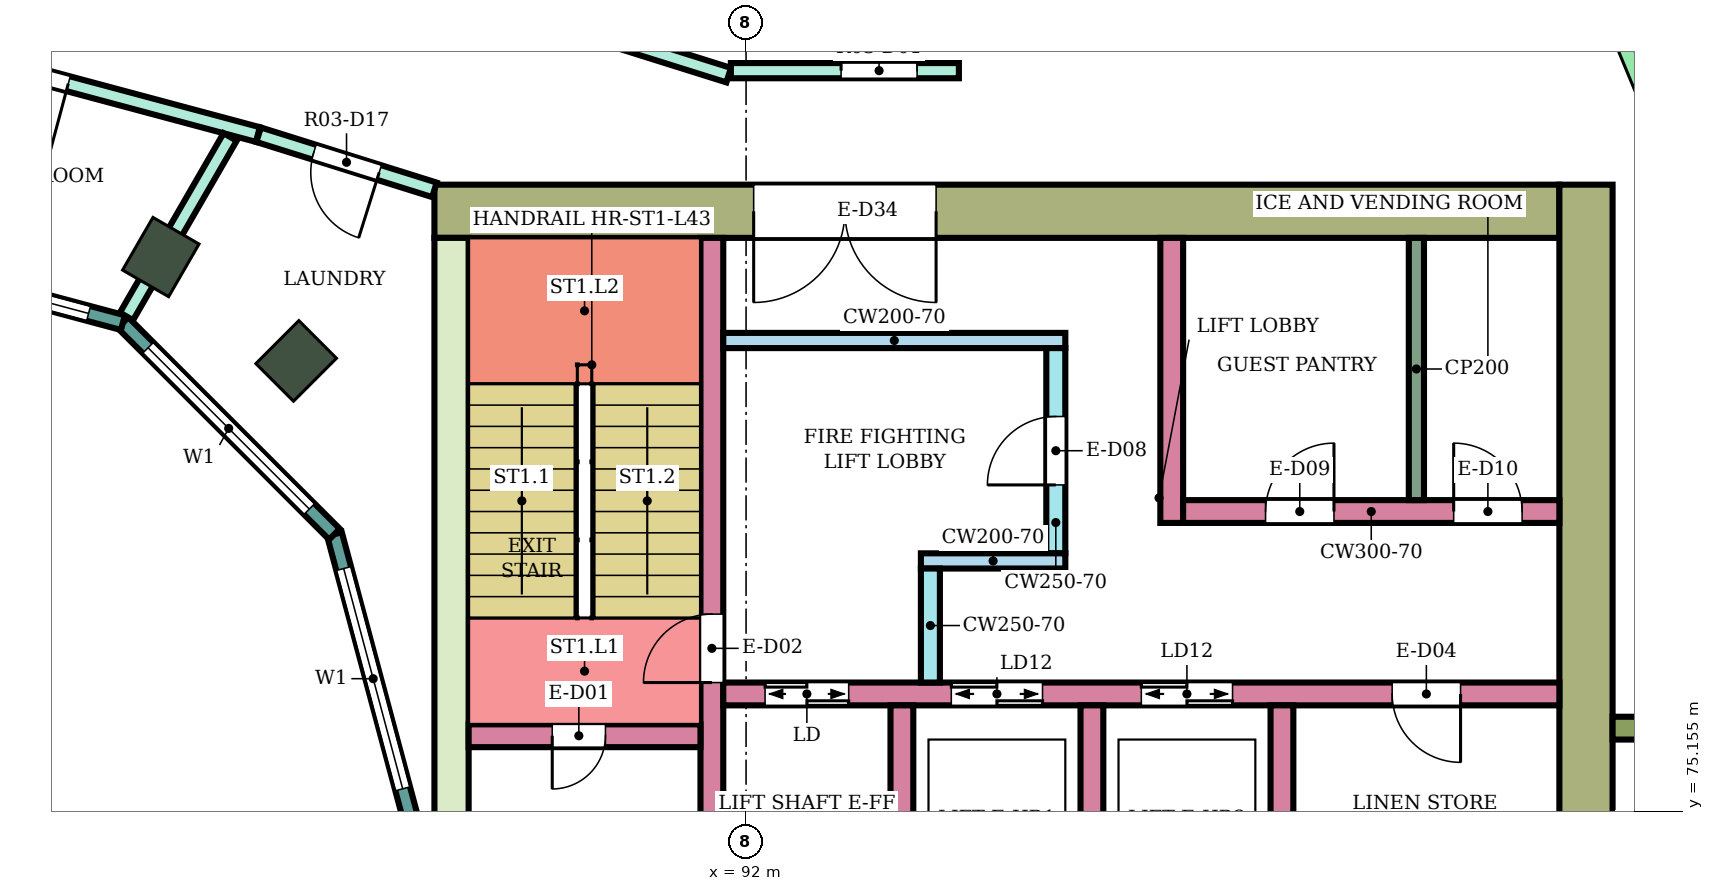
"""IFC4 building model, lengths in metres.
Left out: names, types, materials, properties, quantities, classifications, styles, units other than length and angle.
Written with IfcOpenShell. Run it as: python <this file> out.ifc"""

import sys

from ifc_helpers import new_model, si_unit, direction, frame, frame_2d, origin, origin_2d, place, context, subcontext, project, spatial, rectangle, extrude, element, fill, save


model = new_model("IFC4")
c1 = context("Model", 3, precision=1e-05, world=origin(), true_north=direction((0.0, 1.0)))
c2 = subcontext(c1, "Body", "Model", "MODEL_VIEW")
j1 = project(units=[si_unit("LENGTHUNIT", "METRE"), si_unit("PLANEANGLEUNIT", "RADIAN")], contexts=[c1])
p1 = place(None, origin())
s1 = spatial("IfcSite", under=j1, at=p1, CompositionType="ELEMENT")
p2 = place(p1, origin())
s2 = spatial("IfcBuilding", under=s1, at=p2, CompositionType="ELEMENT")
p3 = place(p2, frame((0.0, 0.0, 186.4)))
s3 = spatial("IfcBuildingStorey", under=s2, at=p3, CompositionType="ELEMENT", Elevation=186.4)
for number, where, z_axis, x_axis in (
    (1, (86.081, 81.081, 0.0), (0.0, 0.0, 1.0), (0.707, 0.707, 0.0)),
    (2, (84.3, 82.448, 0.0), (0.0, 0.0, 1.0), (0.5, 0.866, 0.0)),
):
    element("IfcColumn", number, at=place(p3, frame(where, z_axis=z_axis, x_axis=x_axis)), inside=s3, PredefinedType="COLUMN", context=c2, shape_type="SweptSolid", body=[
        extrude(rectangle(XDim=0.8, YDim=0.7, at=origin_2d()), origin(), (0.0, 0.0, 1.0), 4.1),
    ])
p4 = place(p3, frame((87.9, 83.05, 0.0), z_axis=(0.0, 0.0, 1.0), x_axis=(1.0, 0.0, 0.0)))
e3 = element("IfcWall", 3, at=p4, inside=s3, PredefinedType="SHEAR", context=c2, shape_type="SweptSolid", body=[
    extrude(rectangle(XDim=14.8, YDim=0.7, at=frame_2d((7.4, 0.0))), origin(), (0.0, 0.0, 1.0), 3.78),
])
p5 = place(p4, frame((4.2, 0.0, 0.0)))
e4 = element("IfcOpeningElement", 4, at=p5, cuts=e3, PredefinedType="OPENING", context=c2, shape_type="SweptSolid", body=[
    extrude(rectangle(XDim=2.4, YDim=2.4, at=frame_2d((1.2, 1.2))), frame((0.0, 0.36, 0.0), z_axis=(0.0, -1.0, 0.0), x_axis=(1.0, 0.0, 0.0)), (0.0, 0.0, 1.0), 0.72),
])
p6 = place(p3, frame((88.125, 75.0, 0.0), z_axis=(0.0, 0.0, 1.0), x_axis=(0.0, 1.0, 0.0)))
e5 = element("IfcWall", 5, at=p6, inside=s3, PredefinedType="SHEAR", context=c2, shape_type="SweptSolid", body=[
    extrude(rectangle(XDim=7.7, YDim=0.45, at=frame_2d((3.85, 0.0))), origin(), (0.0, 0.0, 1.0), 3.78),
])
p7 = place(p3, frame((103.05, 66.6, 0.0), z_axis=(0.0, 0.0, 1.0), x_axis=(0.0, 1.0, 0.0)))
e6 = element("IfcWall", 6, at=p7, inside=s3, PredefinedType="SHEAR", context=c2, shape_type="SweptSolid", body=[
    extrude(rectangle(XDim=16.8, YDim=0.7, at=frame_2d((8.4, 0.0))), origin(), (0.0, 0.0, 1.0), 3.78),
])
p8 = place(p3, frame((91.55, 75.0, 0.0), z_axis=(0.0, 0.0, 1.0), x_axis=(0.0, 1.0, 0.0)))
e7 = element("IfcWall", 7, at=p8, inside=s3, PredefinedType="SHEAR", context=c2, shape_type="SweptSolid", body=[
    extrude(rectangle(XDim=7.7, YDim=0.3, at=frame_2d((3.85, 0.0))), origin(), (0.0, 0.0, 1.0), 3.78),
])
p9 = place(p8, frame((1.85, 0.0, 0.0)))
e8 = element("IfcOpeningElement", 8, at=p9, cuts=e7, PredefinedType="OPENING", context=c2, shape_type="SweptSolid", body=[
    extrude(rectangle(XDim=0.9, YDim=2.1, at=frame_2d((0.45, 1.05))), frame((0.0, 0.16, 0.0), z_axis=(0.0, -1.0, 0.0), x_axis=(1.0, 0.0, 0.0)), (0.0, 0.0, 1.0), 0.32),
])
p10 = place(p3, frame((88.35, 76.15, 0.0), z_axis=(0.0, 0.0, 1.0), x_axis=(1.0, 0.0, 0.0)))
e9 = element("IfcWall", 9, at=p10, inside=s3, PredefinedType="SHEAR", context=c2, shape_type="SweptSolid", body=[
    extrude(rectangle(XDim=3.05, YDim=0.3, at=frame_2d((1.525, 0.0))), origin(), (0.0, 0.0, 1.0), 3.78),
])
p11 = place(p10, frame((1.1, 0.0, 0.0)))
e10 = element("IfcOpeningElement", 10, at=p11, cuts=e9, PredefinedType="OPENING", context=c2, shape_type="SweptSolid", body=[
    extrude(rectangle(XDim=0.7, YDim=2.0, at=frame_2d((0.35, 1.0))), frame((0.0, 0.16, 0.0), z_axis=(0.0, -1.0, 0.0), x_axis=(1.0, 0.0, 0.0)), (0.0, 0.0, 1.0), 0.32),
])
p12 = place(p3, frame((91.7, 76.7, 0.0), z_axis=(0.0, 0.0, 1.0), x_axis=(1.0, 0.0, 0.0)))
e11 = element("IfcWall", 11, at=p12, inside=s3, PredefinedType="SHEAR", context=c2, shape_type="SweptSolid", body=[
    extrude(rectangle(XDim=11.0, YDim=0.3, at=frame_2d((5.5, 0.0))), origin(), (0.0, 0.0, 1.0), 3.78),
])
p13 = place(p12, frame((0.55, 0.0, 0.0)))
e12 = element("IfcOpeningElement", 12, at=p13, cuts=e11, PredefinedType="OPENING", context=c2, shape_type="SweptSolid", body=[
    extrude(rectangle(XDim=1.1, YDim=2.1, at=frame_2d((0.55, 1.05))), frame((0.0, 0.16, 0.0), z_axis=(0.0, -1.0, 0.0), x_axis=(1.0, 0.0, 0.0)), (0.0, 0.0, 1.0), 0.32),
])
p14 = place(p12, frame((3.0, 0.0, 0.0)))
e13 = element("IfcOpeningElement", 13, at=p14, cuts=e11, PredefinedType="OPENING", context=c2, shape_type="SweptSolid", body=[
    extrude(rectangle(XDim=1.2, YDim=2.1, at=frame_2d((0.6, 1.05))), frame((0.0, 0.16, 0.0), z_axis=(0.0, -1.0, 0.0), x_axis=(1.0, 0.0, 0.0)), (0.0, 0.0, 1.0), 0.32),
])
p15 = place(p12, frame((5.5, 0.0, 0.0)))
e14 = element("IfcOpeningElement", 14, at=p15, cuts=e11, PredefinedType="OPENING", context=c2, shape_type="SweptSolid", body=[
    extrude(rectangle(XDim=1.2, YDim=2.1, at=frame_2d((0.6, 1.05))), frame((0.0, 0.16, 0.0), z_axis=(0.0, -1.0, 0.0), x_axis=(1.0, 0.0, 0.0)), (0.0, 0.0, 1.0), 0.32),
])
p16 = place(p12, frame((8.8, 0.0, 0.0)))
e15 = element("IfcOpeningElement", 15, at=p16, cuts=e11, PredefinedType="OPENING", context=c2, shape_type="SweptSolid", body=[
    extrude(rectangle(XDim=0.9, YDim=2.1, at=frame_2d((0.45, 1.05))), frame((0.0, 0.16, 0.0), z_axis=(0.0, -1.0, 0.0), x_axis=(1.0, 0.0, 0.0)), (0.0, 0.0, 1.0), 0.32),
])
for number, where, z_axis, x_axis in (
    (16, (94.05, 74.0, 0.0), (0.0, 0.0, 1.0), (0.0, 1.0, 0.0)),
    (17, (96.55, 74.0, 0.0), (0.0, 0.0, 1.0), (0.0, 1.0, 0.0)),
    (18, (99.05, 74.0, 0.0), (0.0, 0.0, 1.0), (0.0, 1.0, 0.0)),
):
    element("IfcWall", number, at=place(p3, frame(where, z_axis=z_axis, x_axis=x_axis)), inside=s3, PredefinedType="SHEAR", context=c2, shape_type="SweptSolid", body=[
        extrude(rectangle(XDim=2.55, YDim=0.3, at=frame_2d((1.275, 0.0))), origin(), (0.0, 0.0, 1.0), 3.78),
    ])
p17 = place(p3, frame((91.7, 81.35, 0.0), z_axis=(0.0, 0.0, 1.0), x_axis=(1.0, 0.0, 0.0)))
e19 = element("IfcWall", 19, at=p17, inside=s3, PredefinedType="SHEAR", context=c2, shape_type="SweptSolid", body=[
    extrude(rectangle(XDim=4.5, YDim=0.2, at=frame_2d((2.25, 0.0))), origin(), (0.0, 0.0, 1.0), 3.78),
])
p18 = place(p3, frame((96.075, 78.55, 0.0), z_axis=(0.0, 0.0, 1.0), x_axis=(0.0, 1.0, 0.0)))
e20 = element("IfcWall", 20, at=p18, inside=s3, PredefinedType="SHEAR", context=c2, shape_type="SweptSolid", body=[
    extrude(rectangle(XDim=2.7, YDim=0.25, at=frame_2d((1.35, 0.0))), origin(), (0.0, 0.0, 1.0), 3.78),
])
p19 = place(p18, frame((0.9, 0.0, 0.0)))
e21 = element("IfcOpeningElement", 21, at=p19, cuts=e20, PredefinedType="OPENING", context=c2, shape_type="SweptSolid", body=[
    extrude(rectangle(XDim=0.9, YDim=2.1, at=frame_2d((0.45, 1.05))), frame((0.0, 0.135, 0.0), z_axis=(0.0, -1.0, 0.0), x_axis=(1.0, 0.0, 0.0)), (0.0, 0.0, 1.0), 0.27),
])
p20 = place(p3, frame((94.3, 78.45, 0.0), z_axis=(0.0, 0.0, 1.0), x_axis=(1.0, 0.0, 0.0)))
e22 = element("IfcWall", 22, at=p20, inside=s3, PredefinedType="SHEAR", context=c2, shape_type="SweptSolid", body=[
    extrude(rectangle(XDim=1.9, YDim=0.2, at=frame_2d((0.95, 0.0))), origin(), (0.0, 0.0, 1.0), 3.78),
])
p21 = place(p3, frame((94.425, 76.85, 0.0), z_axis=(0.0, 0.0, 1.0), x_axis=(0.0, 1.0, 0.0)))
e23 = element("IfcWall", 23, at=p21, inside=s3, PredefinedType="SHEAR", context=c2, shape_type="SweptSolid", body=[
    extrude(rectangle(XDim=1.5, YDim=0.25, at=frame_2d((0.75, 0.0))), origin(), (0.0, 0.0, 1.0), 3.78),
])
p22 = place(p3, frame((97.6, 78.95, 0.0), z_axis=(0.0, 0.0, 1.0), x_axis=(0.0, 1.0, 0.0)))
e24 = element("IfcWall", 24, at=p22, inside=s3, PredefinedType="SHEAR", context=c2, shape_type="SweptSolid", body=[
    extrude(rectangle(XDim=3.75, YDim=0.3, at=frame_2d((1.875, 0.0))), origin(), (0.0, 0.0, 1.0), 3.78),
])
p23 = place(p3, frame((97.75, 79.1, 0.0), z_axis=(0.0, 0.0, 1.0), x_axis=(1.0, 0.0, 0.0)))
e25 = element("IfcWall", 25, at=p23, inside=s3, PredefinedType="SHEAR", context=c2, shape_type="SweptSolid", body=[
    extrude(rectangle(XDim=4.95, YDim=0.3, at=frame_2d((2.475, 0.0))), origin(), (0.0, 0.0, 1.0), 3.78),
])
p24 = place(p23, frame((1.084, 0.0, 0.0)))
e26 = element("IfcOpeningElement", 26, at=p24, cuts=e25, PredefinedType="OPENING", context=c2, shape_type="SweptSolid", body=[
    extrude(rectangle(XDim=0.9, YDim=2.1, at=frame_2d((0.45, 1.05))), frame((0.0, 0.16, 0.0), z_axis=(0.0, -1.0, 0.0), x_axis=(1.0, 0.0, 0.0)), (0.0, 0.0, 1.0), 0.32),
])
p25 = place(p23, frame((3.56, 0.0, 0.0)))
e27 = element("IfcOpeningElement", 27, at=p25, cuts=e25, PredefinedType="OPENING", context=c2, shape_type="SweptSolid", body=[
    extrude(rectangle(XDim=0.9, YDim=2.1, at=frame_2d((0.45, 1.05))), frame((0.0, 0.16, 0.0), z_axis=(0.0, -1.0, 0.0), x_axis=(1.0, 0.0, 0.0)), (0.0, 0.0, 1.0), 0.32),
])
p26 = place(p3, frame((103.4, 76.25, 0.0), z_axis=(0.0, 0.0, 1.0), x_axis=(1.0, 0.0, 0.0)))
e28 = element("IfcWall", 28, at=p26, inside=s3, PredefinedType="NOTDEFINED", context=c2, shape_type="SweptSolid", body=[
    extrude(rectangle(XDim=2.416, YDim=0.3, at=frame_2d((1.208, 0.0))), origin(), (0.0, 0.0, 1.0), 4.1),
])
p27 = place(p3, frame((87.604, 75.0, 0.0), z_axis=(0.0, 0.0, 1.0), x_axis=(-0.258789828301, 0.965933654434, 0.0)))
e29 = element("IfcWall", 29, at=p27, inside=s3, PredefinedType="NOTDEFINED", context=c2, shape_type="SweptSolid", body=[
    extrude(rectangle(XDim=3.936, YDim=0.2, at=frame_2d((1.968, 0.0))), origin(), (0.0, 0.0, 1.0), 4.1),
])
p28 = place(p27, frame((0.468, 0.0, 0.9)))
e30 = element("IfcOpeningElement", 30, at=p28, cuts=e29, PredefinedType="OPENING", context=c2, shape_type="SweptSolid", body=[
    extrude(rectangle(XDim=3.0, YDim=2.3, at=frame_2d((1.5, 1.15))), frame((0.0, 0.11, 0.0), z_axis=(0.0, -1.0, 0.0), x_axis=(1.0, 0.0, 0.0)), (0.0, 0.0, 1.0), 0.22),
])
p29 = place(p3, frame((86.585, 78.802, 0.0), z_axis=(0.0, 0.0, 1.0), x_axis=(-0.707106781187, 0.707106781187, 0.0)))
e31 = element("IfcWall", 31, at=p29, inside=s3, PredefinedType="NOTDEFINED", context=c2, shape_type="SweptSolid", body=[
    extrude(rectangle(XDim=3.936, YDim=0.2, at=frame_2d((1.968, 0.0))), origin(), (0.0, 0.0, 1.0), 4.1),
])
p30 = place(p29, frame((0.468, 0.0, 0.9)))
e32 = element("IfcOpeningElement", 32, at=p30, cuts=e31, PredefinedType="OPENING", context=c2, shape_type="SweptSolid", body=[
    extrude(rectangle(XDim=3.0, YDim=2.3, at=frame_2d((1.5, 1.15))), frame((0.0, 0.11, 0.0), z_axis=(0.0, -1.0, 0.0), x_axis=(1.0, 0.0, 0.0)), (0.0, 0.0, 1.0), 0.22),
])
p31 = place(p3, frame((83.802, 81.585, 0.0), z_axis=(0.0, 0.0, 1.0), x_axis=(-0.965933654434, 0.258789828301, 0.0)))
e33 = element("IfcWall", 33, at=p31, inside=s3, PredefinedType="NOTDEFINED", context=c2, shape_type="SweptSolid", body=[
    extrude(rectangle(XDim=3.936, YDim=0.2, at=frame_2d((1.968, 0.0))), origin(), (0.0, 0.0, 1.0), 4.1),
])
p32 = place(p31, frame((0.468, 0.0, 0.9)))
e34 = element("IfcOpeningElement", 34, at=p32, cuts=e33, PredefinedType="OPENING", context=c2, shape_type="SweptSolid", body=[
    extrude(rectangle(XDim=3.0, YDim=2.3, at=frame_2d((1.5, 1.15))), frame((0.0, 0.11, 0.0), z_axis=(0.0, -1.0, 0.0), x_axis=(1.0, 0.0, 0.0)), (0.0, 0.0, 1.0), 0.22),
])
p33 = place(p3, frame((80.0, 85.554, 0.0), z_axis=(0.0, 0.0, 1.0), x_axis=(0.965928989968, -0.258807237802, 0.0)))
e35 = element("IfcWall", 35, at=p33, inside=s3, PredefinedType="PARTITIONING", context=c2, shape_type="SweptSolid", body=[
    extrude(rectangle(XDim=5.774, YDim=0.2, at=frame_2d((2.887, 0.0))), origin(), (0.0, 0.0, 1.0), 3.65),
])
p34 = place(p33, frame((2.292, 0.0, 0.0)))
e36 = element("IfcOpeningElement", 36, at=p34, cuts=e35, PredefinedType="OPENING", context=c2, shape_type="SweptSolid", body=[
    extrude(rectangle(XDim=0.9, YDim=2.1, at=frame_2d((0.45, 1.05))), frame((0.0, 0.11, 0.0), z_axis=(0.0, -1.0, 0.0), x_axis=(1.0, 0.0, 0.0)), (0.0, 0.0, 1.0), 0.22),
])
p35 = place(p3, frame((83.849, 81.667, 0.0), z_axis=(0.0, 0.0, 1.0), x_axis=(0.500117899823, 0.865957323588, 0.0)))
e37 = element("IfcWall", 37, at=p35, inside=s3, PredefinedType="PARTITIONING", context=c2, shape_type="SweptSolid", body=[
    extrude(rectangle(XDim=2.725, YDim=0.2, at=frame_2d((1.363, 0.0))), origin(), (0.0, 0.0, 1.0), 3.65),
])
p36 = place(p3, frame((85.587, 84.057, 0.0), z_axis=(0.0, 0.0, 1.0), x_axis=(0.954239513179, -0.299043393987, 0.0)))
e38 = element("IfcWall", 38, at=p36, inside=s3, PredefinedType="PARTITIONING", context=c2, shape_type="SweptSolid", body=[
    extrude(rectangle(XDim=2.424, YDim=0.2, at=frame_2d((1.212, 0.0))), origin(), (0.0, 0.0, 1.0), 3.65),
])
p37 = place(p36, frame((0.762, 0.0, 0.0)))
e39 = element("IfcOpeningElement", 39, at=p37, cuts=e38, PredefinedType="OPENING", context=c2, shape_type="SweptSolid", body=[
    extrude(rectangle(XDim=0.9, YDim=2.1, at=frame_2d((0.45, 1.05))), frame((0.0, 0.11, 0.0), z_axis=(0.0, -1.0, 0.0), x_axis=(1.0, 0.0, 0.0)), (0.0, 0.0, 1.0), 0.22),
])
p38 = place(p3, frame((86.313, 86.554, 0.0), z_axis=(0.0, 0.0, 1.0), x_axis=(0.954081217458, -0.299548043717, 0.0)))
e40 = element("IfcWall", 40, at=p38, inside=s3, PredefinedType="PARTITIONING", context=c2, shape_type="SweptSolid", body=[
    extrude(rectangle(XDim=5.721, YDim=0.2, at=frame_2d((2.86, 0.0))), origin(), (0.0, 0.0, 1.0), 3.65),
])
p39 = place(p3, frame((91.8, 84.9, 0.0), z_axis=(0.0, 0.0, 1.0), x_axis=(1.0, 0.0, 0.0)))
e41 = element("IfcWall", 41, at=p39, inside=s3, PredefinedType="PARTITIONING", context=c2, shape_type="SweptSolid", body=[
    extrude(rectangle(XDim=3.0, YDim=0.2, at=frame_2d((1.5, 0.0))), origin(), (0.0, 0.0, 1.0), 3.65),
])
p40 = place(p39, frame((1.45, 0.0, 0.0)))
e42 = element("IfcOpeningElement", 42, at=p40, cuts=e41, PredefinedType="OPENING", context=c2, shape_type="SweptSolid", body=[
    extrude(rectangle(XDim=1.0, YDim=2.1, at=frame_2d((0.5, 1.05))), frame((0.0, 0.11, 0.0), z_axis=(0.0, -1.0, 0.0), x_axis=(1.0, 0.0, 0.0)), (0.0, 0.0, 1.0), 0.22),
])
p41 = place(p3, frame((100.819, 79.25, 0.0), z_axis=(0.0, 0.0, 1.0), x_axis=(0.0, 1.0, 0.0)))
e43 = element("IfcWall", 43, at=p41, inside=s3, PredefinedType="PARTITIONING", context=c2, shape_type="SweptSolid", body=[
    extrude(rectangle(XDim=3.45, YDim=0.2, at=frame_2d((1.725, 0.0))), origin(), (0.0, 0.0, 1.0), 3.78),
])
p42 = place(p28, origin())
e44 = element("IfcWindow", 44, at=p42, inside=s3, PartitioningType="SINGLE_PANEL", PredefinedType="WINDOW", context=c2, shape_type="SweptSolid", body=[
    extrude(rectangle(XDim=3.0, YDim=2.3, at=frame_2d((1.5, 1.15))), frame((0.0, 0.03, 0.0), z_axis=(0.0, -1.0, 0.0), x_axis=(1.0, 0.0, 0.0)), (0.0, 0.0, 1.0), 0.06),
])
fill(e30, e44)
p43 = place(p30, origin())
e45 = element("IfcWindow", 45, at=p43, inside=s3, PartitioningType="SINGLE_PANEL", PredefinedType="WINDOW", context=c2, shape_type="SweptSolid", body=[
    extrude(rectangle(XDim=3.0, YDim=2.3, at=frame_2d((1.5, 1.15))), frame((0.0, 0.03, 0.0), z_axis=(0.0, -1.0, 0.0), x_axis=(1.0, 0.0, 0.0)), (0.0, 0.0, 1.0), 0.06),
])
fill(e32, e45)
p44 = place(p32, origin())
e46 = element("IfcWindow", 46, at=p44, inside=s3, PartitioningType="SINGLE_PANEL", PredefinedType="WINDOW", context=c2, shape_type="SweptSolid", body=[
    extrude(rectangle(XDim=3.0, YDim=2.3, at=frame_2d((1.5, 1.15))), frame((0.0, 0.03, 0.0), z_axis=(0.0, -1.0, 0.0), x_axis=(1.0, 0.0, 0.0)), (0.0, 0.0, 1.0), 0.06),
])
fill(e34, e46)
p45 = place(p40, origin())
e47 = element("IfcDoor", 47, at=p45, inside=s3, OperationType="SINGLE_SWING_LEFT", PredefinedType="DOOR", context=c2, shape_type="SweptSolid", body=[
    extrude(rectangle(XDim=1.0, YDim=2.1, at=frame_2d((0.5, 1.05))), frame((0.0, 0.025, 0.0), z_axis=(0.0, -1.0, 0.0), x_axis=(1.0, 0.0, 0.0)), (0.0, 0.0, 1.0), 0.05),
])
fill(e42, e47)
p46 = place(p37, frame((0.9, 0.0, 0.0), z_axis=(0.0, 0.0, 1.0), x_axis=(-1.0, 0.0, 0.0)))
e48 = element("IfcDoor", 48, at=p46, inside=s3, OperationType="SINGLE_SWING_LEFT", PredefinedType="DOOR", context=c2, shape_type="SweptSolid", body=[
    extrude(rectangle(XDim=0.9, YDim=2.1, at=frame_2d((0.45, 1.05))), frame((0.0, 0.025, 0.0), z_axis=(0.0, -1.0, 0.0), x_axis=(1.0, 0.0, 0.0)), (0.0, 0.0, 1.0), 0.05),
])
fill(e39, e48)
p47 = place(p34, frame((0.9, 0.0, 0.0), z_axis=(0.0, 0.0, 1.0), x_axis=(-1.0, 0.0, 0.0)))
e49 = element("IfcDoor", 49, at=p47, inside=s3, OperationType="SINGLE_SWING_LEFT", PredefinedType="DOOR", context=c2, shape_type="SweptSolid", body=[
    extrude(rectangle(XDim=0.9, YDim=2.1, at=frame_2d((0.45, 1.05))), frame((0.0, 0.025, 0.0), z_axis=(0.0, -1.0, 0.0), x_axis=(1.0, 0.0, 0.0)), (0.0, 0.0, 1.0), 0.05),
])
fill(e36, e49)
p48 = place(p11, frame((0.7, 0.0, 0.0), z_axis=(0.0, 0.0, 1.0), x_axis=(-1.0, 0.0, 0.0)))
e50 = element("IfcDoor", 50, at=p48, inside=s3, OperationType="SINGLE_SWING_RIGHT", PredefinedType="DOOR", context=c2, shape_type="SweptSolid", body=[
    extrude(rectangle(XDim=0.7, YDim=2.0, at=frame_2d((0.35, 1.0))), frame((0.0, 0.025, 0.0), z_axis=(0.0, -1.0, 0.0), x_axis=(1.0, 0.0, 0.0)), (0.0, 0.0, 1.0), 0.05),
])
fill(e10, e50)
p49 = place(p9, origin())
e51 = element("IfcDoor", 51, at=p49, inside=s3, OperationType="SINGLE_SWING_LEFT", PredefinedType="DOOR", context=c2, shape_type="SweptSolid", body=[
    extrude(rectangle(XDim=0.9, YDim=2.1, at=frame_2d((0.45, 1.05))), frame((0.0, 0.025, 0.0), z_axis=(0.0, -1.0, 0.0), x_axis=(1.0, 0.0, 0.0)), (0.0, 0.0, 1.0), 0.05),
])
fill(e8, e51)
p50 = place(p13, origin())
e52 = element("IfcDoor", 52, at=p50, inside=s3, OperationType="DOUBLE_DOOR_SLIDING", PredefinedType="DOOR", context=c2, shape_type="SweptSolid", body=[
    extrude(rectangle(XDim=1.1, YDim=2.1, at=frame_2d((0.55, 1.05))), frame((0.0, 0.025, 0.0), z_axis=(0.0, -1.0, 0.0), x_axis=(1.0, 0.0, 0.0)), (0.0, 0.0, 1.0), 0.05),
])
fill(e12, e52)
p51 = place(p14, origin())
e53 = element("IfcDoor", 53, at=p51, inside=s3, OperationType="DOUBLE_DOOR_SLIDING", PredefinedType="DOOR", context=c2, shape_type="SweptSolid", body=[
    extrude(rectangle(XDim=1.2, YDim=2.1, at=frame_2d((0.6, 1.05))), frame((0.0, 0.025, 0.0), z_axis=(0.0, -1.0, 0.0), x_axis=(1.0, 0.0, 0.0)), (0.0, 0.0, 1.0), 0.05),
])
fill(e13, e53)
p52 = place(p15, origin())
e54 = element("IfcDoor", 54, at=p52, inside=s3, OperationType="DOUBLE_DOOR_SLIDING", PredefinedType="DOOR", context=c2, shape_type="SweptSolid", body=[
    extrude(rectangle(XDim=1.2, YDim=2.1, at=frame_2d((0.6, 1.05))), frame((0.0, 0.025, 0.0), z_axis=(0.0, -1.0, 0.0), x_axis=(1.0, 0.0, 0.0)), (0.0, 0.0, 1.0), 0.05),
])
fill(e14, e54)
p53 = place(p16, frame((0.9, 0.0, 0.0), z_axis=(0.0, 0.0, 1.0), x_axis=(-1.0, 0.0, 0.0)))
e55 = element("IfcDoor", 55, at=p53, inside=s3, OperationType="SINGLE_SWING_LEFT", PredefinedType="DOOR", context=c2, shape_type="SweptSolid", body=[
    extrude(rectangle(XDim=0.9, YDim=2.1, at=frame_2d((0.45, 1.05))), frame((0.0, 0.025, 0.0), z_axis=(0.0, -1.0, 0.0), x_axis=(1.0, 0.0, 0.0)), (0.0, 0.0, 1.0), 0.05),
])
fill(e15, e55)
p54 = place(p19, origin())
e56 = element("IfcDoor", 56, at=p54, inside=s3, OperationType="SINGLE_SWING_LEFT", PredefinedType="DOOR", context=c2, shape_type="SweptSolid", body=[
    extrude(rectangle(XDim=0.9, YDim=2.1, at=frame_2d((0.45, 1.05))), frame((0.0, 0.025, 0.0), z_axis=(0.0, -1.0, 0.0), x_axis=(1.0, 0.0, 0.0)), (0.0, 0.0, 1.0), 0.05),
])
fill(e21, e56)
p55 = place(p24, origin())
e57 = element("IfcDoor", 57, at=p55, inside=s3, OperationType="SINGLE_SWING_RIGHT", PredefinedType="DOOR", context=c2, shape_type="SweptSolid", body=[
    extrude(rectangle(XDim=0.9, YDim=2.1, at=frame_2d((0.45, 1.05))), frame((0.0, 0.025, 0.0), z_axis=(0.0, -1.0, 0.0), x_axis=(1.0, 0.0, 0.0)), (0.0, 0.0, 1.0), 0.05),
])
fill(e26, e57)
p56 = place(p25, origin())
e58 = element("IfcDoor", 58, at=p56, inside=s3, OperationType="SINGLE_SWING_LEFT", PredefinedType="DOOR", context=c2, shape_type="SweptSolid", body=[
    extrude(rectangle(XDim=0.9, YDim=2.1, at=frame_2d((0.45, 1.05))), frame((0.0, 0.025, 0.0), z_axis=(0.0, -1.0, 0.0), x_axis=(1.0, 0.0, 0.0)), (0.0, 0.0, 1.0), 0.05),
])
fill(e27, e58)
p57 = place(p5, frame((2.4, 0.0, 0.0), z_axis=(0.0, 0.0, 1.0), x_axis=(-1.0, 0.0, 0.0)))
e59 = element("IfcDoor", 59, at=p57, inside=s3, OperationType="DOUBLE_DOOR_SINGLE_SWING", PredefinedType="DOOR", context=c2, shape_type="SweptSolid", body=[
    extrude(rectangle(XDim=2.4, YDim=2.4, at=frame_2d((1.2, 1.2))), frame((0.0, 0.025, 0.0), z_axis=(0.0, -1.0, 0.0), x_axis=(1.0, 0.0, 0.0)), (0.0, 0.0, 1.0), 0.05),
])
fill(e4, e59)
save(model, sys.argv[1])
